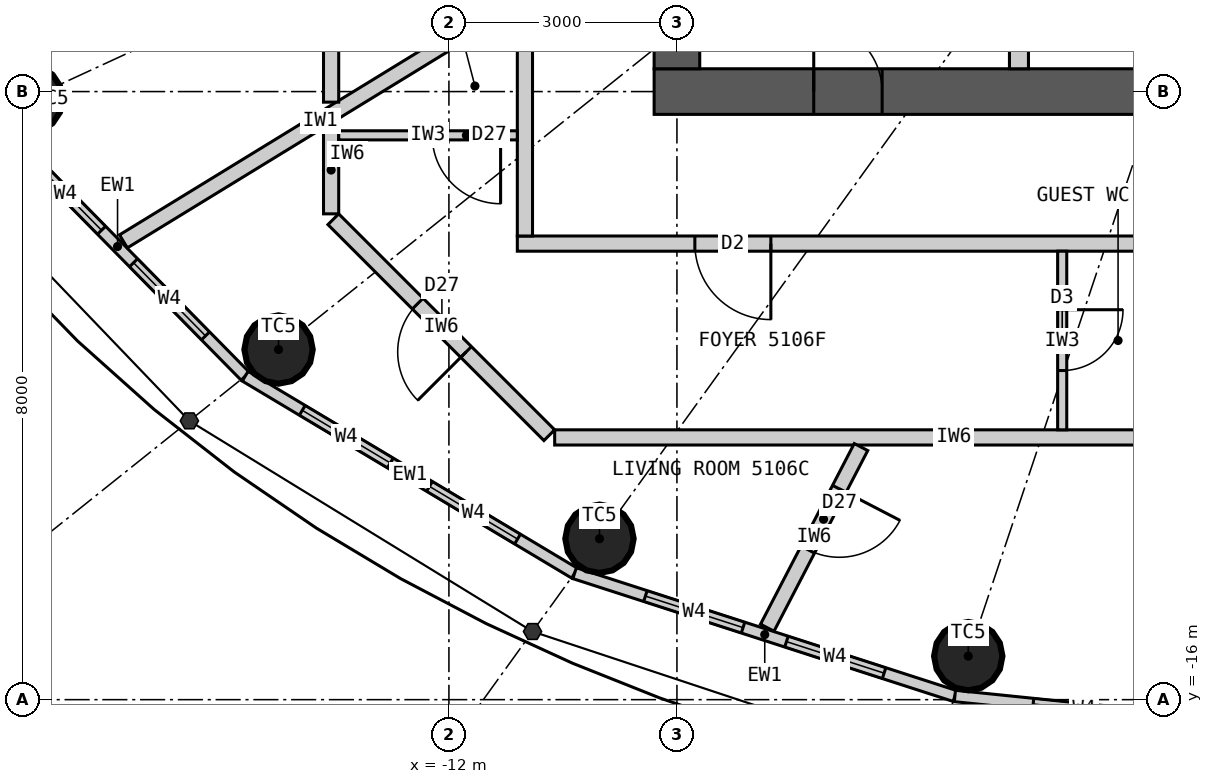
"""IFC4 building model, lengths in metres.
Left out: names, types, materials, properties, quantities, classifications, styles, units other than length and angle.
Written with IfcOpenShell. Run it as: python <this file> out.ifc"""

import sys

from ifc_helpers import new_model, si_unit, direction, frame, frame_2d, origin, origin_2d, place, context, subcontext, project, spatial, rectangle, circle, extrude, element, fill, save


model = new_model("IFC4")
c1 = context("Model", 3, precision=1e-05, world=origin(), true_north=direction((0.0, 1.0)))
c2 = subcontext(c1, "Body", "Model", "MODEL_VIEW")
j1 = project(units=[si_unit("LENGTHUNIT", "METRE"), si_unit("PLANEANGLEUNIT", "RADIAN")], contexts=[c1])
p1 = place(None, origin())
s1 = spatial("IfcSite", under=j1, at=p1, CompositionType="ELEMENT")
p2 = place(p1, origin())
s2 = spatial("IfcBuilding", under=s1, at=p2, CompositionType="ELEMENT")
p3 = place(p2, frame((0.0, 0.0, 192.9)))
s3 = spatial("IfcBuildingStorey", under=s2, at=p3, CompositionType="ELEMENT", Elevation=192.9)
for number, where, z_axis, x_axis in (
    (1, (-17.532, -8.098, 0.0), (0.0, 0.0, 1.0), (1.0, 0.0, 0.0)),
    (2, (-14.241, -11.393, 0.0), (0.0, 0.0, 1.0), (1.0, 0.0, 0.0)),
    (3, (-10.019, -13.883, 0.0), (0.0, 0.0, 1.0), (1.0, 0.0, 0.0)),
    (4, (-5.167, -15.427, 0.0), (0.0, 0.0, 1.0), (1.0, 0.0, 0.0)),
):
    element("IfcColumn", number, at=place(p3, frame(where, z_axis=z_axis, x_axis=x_axis)), inside=s3, PredefinedType="COLUMN", context=c2, shape_type="SweptSolid", body=[
        extrude(circle(Radius=0.45, at=origin_2d()), origin(), (0.0, 0.0, 1.0), 3.3),
    ])
p4 = place(p3, frame((9.3, -8.0, 0.0), z_axis=(0.0, 0.0, 1.0), x_axis=(-1.0, 0.0, 0.0)))
e5 = element("IfcWall", 5, at=p4, inside=s3, PredefinedType="SHEAR", context=c2, shape_type="SweptSolid", body=[
    extrude(rectangle(XDim=18.6, YDim=0.6, at=frame_2d((9.3, 0.0))), origin(), (0.0, 0.0, 1.0), 3.3),
])
p5 = place(p4, frame((8.0, 0.0, 0.0)))
e6 = element("IfcOpeningElement", 6, at=p5, cuts=e5, PredefinedType="OPENING", context=c2, shape_type="SweptSolid", body=[
    extrude(rectangle(XDim=1.2, YDim=2.2, at=frame_2d((0.6, 1.1))), frame((0.0, 0.31, 0.0), z_axis=(0.0, -1.0, 0.0), x_axis=(1.0, 0.0, 0.0)), (0.0, 0.0, 1.0), 0.62),
])
p6 = place(p4, frame((15.6, 0.0, 0.0)))
e7 = element("IfcOpeningElement", 7, at=p6, cuts=e5, PredefinedType="OPENING", context=c2, shape_type="SweptSolid", body=[
    extrude(rectangle(XDim=0.9, YDim=2.2, at=frame_2d((0.45, 1.1))), frame((0.0, 0.31, 0.0), z_axis=(0.0, -1.0, 0.0), x_axis=(1.0, 0.0, 0.0)), (0.0, 0.0, 1.0), 0.62),
])
p7 = place(p3, frame((-9.0, 7.7, 0.0), z_axis=(0.0, 0.0, 1.0), x_axis=(0.0, -1.0, 0.0)))
e8 = element("IfcWall", 8, at=p7, inside=s3, PredefinedType="SHEAR", context=c2, shape_type="SweptSolid", body=[
    extrude(rectangle(XDim=15.4, YDim=0.6, at=frame_2d((7.7, 0.0))), origin(), (0.0, 0.0, 1.0), 3.3),
])
p8 = place(p7, frame((6.8, 0.0, 0.0)))
e9 = element("IfcOpeningElement", 9, at=p8, cuts=e8, PredefinedType="OPENING", context=c2, shape_type="SweptSolid", body=[
    extrude(rectangle(XDim=1.8, YDim=2.2, at=frame_2d((0.9, 1.1))), frame((0.0, 0.31, 0.0), z_axis=(0.0, -1.0, 0.0), x_axis=(1.0, 0.0, 0.0)), (0.0, 0.0, 1.0), 0.62),
])
p9 = place(p3, frame((-4.5, -7.7, 0.0), z_axis=(0.0, 0.0, 1.0), x_axis=(0.0, 1.0, 0.0)))
e10 = element("IfcWall", 10, at=p9, inside=s3, PredefinedType="PARTITIONING", context=c2, shape_type="SweptSolid", body=[
    extrude(rectangle(XDim=3.2, YDim=0.25, at=frame_2d((1.6, 0.0))), origin(), (0.0, 0.0, 1.0), 3.3),
])
p10 = place(p3, frame((-18.04, -8.332, 0.0), z_axis=(0.0, 0.0, 1.0), x_axis=(0.701527379618, -0.712642501993, 0.0)))
e11 = element("IfcWall", 11, at=p10, inside=s3, PredefinedType="ELEMENTEDWALL", context=c2, shape_type="SweptSolid", body=[
    extrude(rectangle(XDim=4.788, YDim=0.15, at=frame_2d((2.394, 0.0))), origin(), (0.0, 0.0, 1.0), 3.12),
])
p11 = place(p10, frame((0.744, 0.0, 0.9)))
e12 = element("IfcOpeningElement", 12, at=p11, cuts=e11, PredefinedType="OPENING", context=c2, shape_type="SweptSolid", body=[
    extrude(rectangle(XDim=1.35, YDim=1.9, at=frame_2d((0.675, 0.95))), frame((0.0, 0.085, 0.0), z_axis=(0.0, -1.0, 0.0), x_axis=(1.0, 0.0, 0.0)), (0.0, 0.0, 1.0), 0.17),
])
p12 = place(p10, frame((2.694, 0.0, 0.9)))
e13 = element("IfcOpeningElement", 13, at=p12, cuts=e11, PredefinedType="OPENING", context=c2, shape_type="SweptSolid", body=[
    extrude(rectangle(XDim=1.35, YDim=1.9, at=frame_2d((0.675, 0.95))), frame((0.0, 0.085, 0.0), z_axis=(0.0, -1.0, 0.0), x_axis=(1.0, 0.0, 0.0)), (0.0, 0.0, 1.0), 0.17),
])
p13 = place(p3, frame((-14.68, -11.744, 0.0), z_axis=(0.0, 0.0, 1.0), x_axis=(0.85822150553, -0.513279502265, 0.0)))
e14 = element("IfcWall", 14, at=p13, inside=s3, PredefinedType="ELEMENTEDWALL", context=c2, shape_type="SweptSolid", body=[
    extrude(rectangle(XDim=5.05, YDim=0.15, at=frame_2d((2.525, 0.0))), origin(), (0.0, 0.0, 1.0), 3.12),
])
p14 = place(p13, frame((0.875, 0.0, 0.9)))
e15 = element("IfcOpeningElement", 15, at=p14, cuts=e14, PredefinedType="OPENING", context=c2, shape_type="SweptSolid", body=[
    extrude(rectangle(XDim=1.35, YDim=1.9, at=frame_2d((0.675, 0.95))), frame((0.0, 0.085, 0.0), z_axis=(0.0, -1.0, 0.0), x_axis=(1.0, 0.0, 0.0)), (0.0, 0.0, 1.0), 0.17),
])
p15 = place(p13, frame((2.825, 0.0, 0.9)))
e16 = element("IfcOpeningElement", 16, at=p15, cuts=e14, PredefinedType="OPENING", context=c2, shape_type="SweptSolid", body=[
    extrude(rectangle(XDim=1.35, YDim=1.9, at=frame_2d((0.675, 0.95))), frame((0.0, 0.085, 0.0), z_axis=(0.0, -1.0, 0.0), x_axis=(1.0, 0.0, 0.0)), (0.0, 0.0, 1.0), 0.17),
])
p16 = place(p3, frame((-10.346, -14.336, 0.0), z_axis=(0.0, 0.0, 1.0), x_axis=(0.951644702515, -0.307200846638, 0.0)))
e17 = element("IfcWall", 17, at=p16, inside=s3, PredefinedType="ELEMENTEDWALL", context=c2, shape_type="SweptSolid", body=[
    extrude(rectangle(XDim=5.258, YDim=0.15, at=frame_2d((2.629, 0.0))), origin(), (0.0, 0.0, 1.0), 3.12),
])
p17 = place(p16, frame((0.979, 0.0, 0.9)))
e18 = element("IfcOpeningElement", 18, at=p17, cuts=e17, PredefinedType="OPENING", context=c2, shape_type="SweptSolid", body=[
    extrude(rectangle(XDim=1.35, YDim=1.9, at=frame_2d((0.675, 0.95))), frame((0.0, 0.085, 0.0), z_axis=(0.0, -1.0, 0.0), x_axis=(1.0, 0.0, 0.0)), (0.0, 0.0, 1.0), 0.17),
])
p18 = place(p16, frame((2.929, 0.0, 0.9)))
e19 = element("IfcOpeningElement", 19, at=p18, cuts=e17, PredefinedType="OPENING", context=c2, shape_type="SweptSolid", body=[
    extrude(rectangle(XDim=1.35, YDim=1.9, at=frame_2d((0.675, 0.95))), frame((0.0, 0.085, 0.0), z_axis=(0.0, -1.0, 0.0), x_axis=(1.0, 0.0, 0.0)), (0.0, 0.0, 1.0), 0.17),
])
p19 = place(p3, frame((-5.343, -15.952, 0.0), z_axis=(0.0, 0.0, 1.0), x_axis=(0.994774574972, -0.102095763818, 0.0)))
e20 = element("IfcWall", 20, at=p19, inside=s3, PredefinedType="ELEMENTEDWALL", context=c2, shape_type="SweptSolid", body=[
    extrude(rectangle(XDim=5.371, YDim=0.15, at=frame_2d((2.686, 0.0))), origin(), (0.0, 0.0, 1.0), 3.12),
])
p20 = place(p19, frame((1.035, 0.0, 0.9)))
e21 = element("IfcOpeningElement", 21, at=p20, cuts=e20, PredefinedType="OPENING", context=c2, shape_type="SweptSolid", body=[
    extrude(rectangle(XDim=1.35, YDim=1.9, at=frame_2d((0.675, 0.95))), frame((0.0, 0.085, 0.0), z_axis=(0.0, -1.0, 0.0), x_axis=(1.0, 0.0, 0.0)), (0.0, 0.0, 1.0), 0.17),
])
p21 = place(p19, frame((2.985, 0.0, 0.9)))
e22 = element("IfcOpeningElement", 22, at=p21, cuts=e20, PredefinedType="OPENING", context=c2, shape_type="SweptSolid", body=[
    extrude(rectangle(XDim=1.35, YDim=1.9, at=frame_2d((0.675, 0.95))), frame((0.0, 0.085, 0.0), z_axis=(0.0, -1.0, 0.0), x_axis=(1.0, 0.0, 0.0)), (0.0, 0.0, 1.0), 0.17),
])
p22 = place(p3, frame((11.1, -10.0, 0.0), z_axis=(0.0, 0.0, 1.0), x_axis=(-1.0, 0.0, 0.0)))
e23 = element("IfcWall", 23, at=p22, inside=s3, PredefinedType="PARTITIONING", context=c2, shape_type="SweptSolid", body=[
    extrude(rectangle(XDim=22.2, YDim=0.2, at=frame_2d((11.1, 0.0))), origin(), (0.0, 0.0, 1.0), 3.12),
])
p23 = place(p22, frame((18.864, 0.0, 0.0)))
e24 = element("IfcOpeningElement", 24, at=p23, cuts=e23, PredefinedType="OPENING", context=c2, shape_type="SweptSolid", body=[
    extrude(rectangle(XDim=1.0, YDim=2.2, at=frame_2d((0.5, 1.1))), frame((0.0, 0.11, 0.0), z_axis=(0.0, -1.0, 0.0), x_axis=(1.0, 0.0, 0.0)), (0.0, 0.0, 1.0), 0.22),
])
p24 = place(p22, frame((2.309, 0.0, 0.0)))
e25 = element("IfcOpeningElement", 25, at=p24, cuts=e23, PredefinedType="OPENING", context=c2, shape_type="SweptSolid", body=[
    extrude(rectangle(XDim=1.0, YDim=2.2, at=frame_2d((0.5, 1.1))), frame((0.0, 0.11, 0.0), z_axis=(0.0, -1.0, 0.0), x_axis=(1.0, 0.0, 0.0)), (0.0, 0.0, 1.0), 0.22),
])
p25 = place(p3, frame((-11.0, 9.9, 0.0), z_axis=(0.0, 0.0, 1.0), x_axis=(0.0, -1.0, 0.0)))
e26 = element("IfcWall", 26, at=p25, inside=s3, PredefinedType="PARTITIONING", context=c2, shape_type="SweptSolid", body=[
    extrude(rectangle(XDim=19.8, YDim=0.2, at=frame_2d((9.9, 0.0))), origin(), (0.0, 0.0, 1.0), 3.12),
])
p26 = place(p25, frame((9.495, 0.0, 0.0)))
e27 = element("IfcOpeningElement", 27, at=p26, cuts=e26, PredefinedType="OPENING", context=c2, shape_type="SweptSolid", body=[
    extrude(rectangle(XDim=1.0, YDim=2.2, at=frame_2d((0.5, 1.1))), frame((0.0, 0.11, 0.0), z_axis=(0.0, -1.0, 0.0), x_axis=(1.0, 0.0, 0.0)), (0.0, 0.0, 1.0), 0.22),
])
p27 = place(p3, frame((-11.1, -6.797, 0.0), z_axis=(0.0, 0.0, 1.0), x_axis=(-0.852799818179, -0.522237943963, 0.0)))
e28 = element("IfcWall", 28, at=p27, inside=s3, PredefinedType="PARTITIONING", context=c2, shape_type="SweptSolid", body=[
    extrude(rectangle(XDim=6.077, YDim=0.2, at=frame_2d((3.039, 0.0))), origin(), (0.0, 0.0, 1.0), 3.12),
])
p28 = place(p3, frame((-13.55, 2.801, 0.0), z_axis=(0.0, 0.0, 1.0), x_axis=(0.0, -1.0, 0.0)))
e29 = element("IfcWall", 29, at=p28, inside=s3, PredefinedType="PARTITIONING", context=c2, shape_type="SweptSolid", body=[
    extrude(rectangle(XDim=10.94, YDim=0.2, at=frame_2d((5.47, 0.0))), origin(), (0.0, 0.0, 1.0), 3.12),
])
p29 = place(p28, frame((6.67, 0.0, 0.0)))
e30 = element("IfcOpeningElement", 30, at=p29, cuts=e29, PredefinedType="OPENING", context=c2, shape_type="SweptSolid", body=[
    extrude(rectangle(XDim=0.8, YDim=2.1, at=frame_2d((0.4, 1.05))), frame((0.0, 0.11, 0.0), z_axis=(0.0, -1.0, 0.0), x_axis=(1.0, 0.0, 0.0)), (0.0, 0.0, 1.0), 0.22),
])
p30 = place(p28, frame((2.872, 0.0, 0.0)))
e31 = element("IfcOpeningElement", 31, at=p30, cuts=e29, PredefinedType="OPENING", context=c2, shape_type="SweptSolid", body=[
    extrude(rectangle(XDim=0.9, YDim=2.1, at=frame_2d((0.45, 1.05))), frame((0.0, 0.11, 0.0), z_axis=(0.0, -1.0, 0.0), x_axis=(1.0, 0.0, 0.0)), (0.0, 0.0, 1.0), 0.22),
])
p31 = place(p3, frame((-13.55, -8.456, 0.0), z_axis=(0.0, 0.0, 1.0), x_axis=(0.0, -1.0, 0.0)))
e32 = element("IfcWall", 32, at=p31, inside=s3, PredefinedType="PARTITIONING", context=c2, shape_type="SweptSolid", body=[
    extrude(rectangle(XDim=1.153, YDim=0.2, at=frame_2d((0.576, 0.0))), origin(), (0.0, 0.0, 1.0), 3.12),
])
p32 = place(p3, frame((-13.521, -9.679, 0.0), z_axis=(0.0, 0.0, 1.0), x_axis=(0.707106781187, -0.707106781187, 0.0)))
e33 = element("IfcWall", 33, at=p32, inside=s3, PredefinedType="PARTITIONING", context=c2, shape_type="SweptSolid", body=[
    extrude(rectangle(XDim=4.019, YDim=0.2, at=frame_2d((2.009, 0.0))), origin(), (0.0, 0.0, 1.0), 3.12),
])
p33 = place(p32, frame((1.57, 0.0, 0.0)))
e34 = element("IfcOpeningElement", 34, at=p33, cuts=e33, PredefinedType="OPENING", context=c2, shape_type="SweptSolid", body=[
    extrude(rectangle(XDim=0.9, YDim=2.1, at=frame_2d((0.45, 1.05))), frame((0.0, 0.11, 0.0), z_axis=(0.0, -1.0, 0.0), x_axis=(1.0, 0.0, 0.0)), (0.0, 0.0, 1.0), 0.22),
])
p34 = place(p3, frame((-10.609, -12.55, 0.0), z_axis=(0.0, 0.0, 1.0), x_axis=(1.0, 0.0, 0.0)))
e35 = element("IfcWall", 35, at=p34, inside=s3, PredefinedType="PARTITIONING", context=c2, shape_type="SweptSolid", body=[
    extrude(rectangle(XDim=10.508, YDim=0.2, at=frame_2d((5.254, 0.0))), origin(), (0.0, 0.0, 1.0), 3.12),
])
p35 = place(p34, frame((8.308, 0.0, 0.0)))
e36 = element("IfcOpeningElement", 36, at=p35, cuts=e35, PredefinedType="OPENING", context=c2, shape_type="SweptSolid", body=[
    extrude(rectangle(XDim=0.8, YDim=2.1, at=frame_2d((0.4, 1.05))), frame((0.0, 0.11, 0.0), z_axis=(0.0, -1.0, 0.0), x_axis=(1.0, 0.0, 0.0)), (0.0, 0.0, 1.0), 0.22),
])
p36 = place(p3, frame((-6.578, -12.677, 0.0), z_axis=(0.0, 0.0, 1.0), x_axis=(-0.460620531465, -0.887597164255, 0.0)))
e37 = element("IfcWall", 37, at=p36, inside=s3, PredefinedType="PARTITIONING", context=c2, shape_type="SweptSolid", body=[
    extrude(rectangle(XDim=2.678, YDim=0.2, at=frame_2d((1.339, 0.0))), origin(), (0.0, 0.0, 1.0), 3.12),
])
p37 = place(p36, frame((0.62, 0.0, 0.0)))
e38 = element("IfcOpeningElement", 38, at=p37, cuts=e37, PredefinedType="OPENING", context=c2, shape_type="SweptSolid", body=[
    extrude(rectangle(XDim=0.9, YDim=2.1, at=frame_2d((0.45, 1.05))), frame((0.0, 0.11, 0.0), z_axis=(0.0, -1.0, 0.0), x_axis=(1.0, 0.0, 0.0)), (0.0, 0.0, 1.0), 0.22),
])
p38 = place(p3, frame((-11.1, -8.576, 0.0), z_axis=(0.0, 0.0, 1.0), x_axis=(-1.0, 0.0, 0.0)))
e39 = element("IfcWall", 39, at=p38, inside=s3, PredefinedType="PARTITIONING", context=c2, shape_type="SweptSolid", body=[
    extrude(rectangle(XDim=2.35, YDim=0.12, at=frame_2d((1.175, 0.0))), origin(), (0.0, 0.0, 1.0), 3.12),
])
p39 = place(p38, frame((0.22, 0.0, 0.0)))
e40 = element("IfcOpeningElement", 40, at=p39, cuts=e39, PredefinedType="OPENING", context=c2, shape_type="SweptSolid", body=[
    extrude(rectangle(XDim=0.9, YDim=2.1, at=frame_2d((0.45, 1.05))), frame((0.0, 0.07, 0.0), z_axis=(0.0, -1.0, 0.0), x_axis=(1.0, 0.0, 0.0)), (0.0, 0.0, 1.0), 0.14),
])
p40 = place(p3, frame((-3.931, -10.1, 0.0), z_axis=(0.0, 0.0, 1.0), x_axis=(0.0, -1.0, 0.0)))
e41 = element("IfcWall", 41, at=p40, inside=s3, PredefinedType="PARTITIONING", context=c2, shape_type="SweptSolid", body=[
    extrude(rectangle(XDim=2.35, YDim=0.12, at=frame_2d((1.175, 0.0))), origin(), (0.0, 0.0, 1.0), 3.12),
])
p41 = place(p40, frame((0.77, 0.0, 0.0)))
e42 = element("IfcOpeningElement", 42, at=p41, cuts=e41, PredefinedType="OPENING", context=c2, shape_type="SweptSolid", body=[
    extrude(rectangle(XDim=0.8, YDim=2.1, at=frame_2d((0.4, 1.05))), frame((0.0, 0.07, 0.0), z_axis=(0.0, -1.0, 0.0), x_axis=(1.0, 0.0, 0.0)), (0.0, 0.0, 1.0), 0.14),
])
p42 = place(p11, origin())
e43 = element("IfcWindow", 43, at=p42, inside=s3, PartitioningType="SINGLE_PANEL", PredefinedType="WINDOW", context=c2, shape_type="SweptSolid", body=[
    extrude(rectangle(XDim=1.35, YDim=1.9, at=frame_2d((0.675, 0.95))), frame((0.0, 0.03, 0.0), z_axis=(0.0, -1.0, 0.0), x_axis=(1.0, 0.0, 0.0)), (0.0, 0.0, 1.0), 0.06),
])
fill(e12, e43)
p43 = place(p12, origin())
e44 = element("IfcWindow", 44, at=p43, inside=s3, PartitioningType="SINGLE_PANEL", PredefinedType="WINDOW", context=c2, shape_type="SweptSolid", body=[
    extrude(rectangle(XDim=1.35, YDim=1.9, at=frame_2d((0.675, 0.95))), frame((0.0, 0.03, 0.0), z_axis=(0.0, -1.0, 0.0), x_axis=(1.0, 0.0, 0.0)), (0.0, 0.0, 1.0), 0.06),
])
fill(e13, e44)
p44 = place(p14, origin())
e45 = element("IfcWindow", 45, at=p44, inside=s3, PartitioningType="SINGLE_PANEL", PredefinedType="WINDOW", context=c2, shape_type="SweptSolid", body=[
    extrude(rectangle(XDim=1.35, YDim=1.9, at=frame_2d((0.675, 0.95))), frame((0.0, 0.03, 0.0), z_axis=(0.0, -1.0, 0.0), x_axis=(1.0, 0.0, 0.0)), (0.0, 0.0, 1.0), 0.06),
])
fill(e15, e45)
p45 = place(p15, origin())
e46 = element("IfcWindow", 46, at=p45, inside=s3, PartitioningType="SINGLE_PANEL", PredefinedType="WINDOW", context=c2, shape_type="SweptSolid", body=[
    extrude(rectangle(XDim=1.35, YDim=1.9, at=frame_2d((0.675, 0.95))), frame((0.0, 0.03, 0.0), z_axis=(0.0, -1.0, 0.0), x_axis=(1.0, 0.0, 0.0)), (0.0, 0.0, 1.0), 0.06),
])
fill(e16, e46)
p46 = place(p17, origin())
e47 = element("IfcWindow", 47, at=p46, inside=s3, PartitioningType="SINGLE_PANEL", PredefinedType="WINDOW", context=c2, shape_type="SweptSolid", body=[
    extrude(rectangle(XDim=1.35, YDim=1.9, at=frame_2d((0.675, 0.95))), frame((0.0, 0.03, 0.0), z_axis=(0.0, -1.0, 0.0), x_axis=(1.0, 0.0, 0.0)), (0.0, 0.0, 1.0), 0.06),
])
fill(e18, e47)
p47 = place(p18, origin())
e48 = element("IfcWindow", 48, at=p47, inside=s3, PartitioningType="SINGLE_PANEL", PredefinedType="WINDOW", context=c2, shape_type="SweptSolid", body=[
    extrude(rectangle(XDim=1.35, YDim=1.9, at=frame_2d((0.675, 0.95))), frame((0.0, 0.03, 0.0), z_axis=(0.0, -1.0, 0.0), x_axis=(1.0, 0.0, 0.0)), (0.0, 0.0, 1.0), 0.06),
])
fill(e19, e48)
p48 = place(p20, origin())
e49 = element("IfcWindow", 49, at=p48, inside=s3, PartitioningType="SINGLE_PANEL", PredefinedType="WINDOW", context=c2, shape_type="SweptSolid", body=[
    extrude(rectangle(XDim=1.35, YDim=1.9, at=frame_2d((0.675, 0.95))), frame((0.0, 0.03, 0.0), z_axis=(0.0, -1.0, 0.0), x_axis=(1.0, 0.0, 0.0)), (0.0, 0.0, 1.0), 0.06),
])
fill(e21, e49)
p49 = place(p23, origin())
e50 = element("IfcDoor", 50, at=p49, inside=s3, OperationType="SINGLE_SWING_LEFT", PredefinedType="DOOR", context=c2, shape_type="SweptSolid", body=[
    extrude(rectangle(XDim=1.0, YDim=2.2, at=frame_2d((0.5, 1.1))), frame((0.0, 0.025, 0.0), z_axis=(0.0, -1.0, 0.0), x_axis=(1.0, 0.0, 0.0)), (0.0, 0.0, 1.0), 0.05),
])
fill(e24, e50)
p50 = place(p39, origin())
e51 = element("IfcDoor", 51, at=p50, inside=s3, OperationType="SINGLE_SWING_LEFT", PredefinedType="DOOR", context=c2, shape_type="SweptSolid", body=[
    extrude(rectangle(XDim=0.9, YDim=2.1, at=frame_2d((0.45, 1.05))), frame((0.0, 0.025, 0.0), z_axis=(0.0, -1.0, 0.0), x_axis=(1.0, 0.0, 0.0)), (0.0, 0.0, 1.0), 0.05),
])
fill(e40, e51)
p51 = place(p41, origin())
e52 = element("IfcDoor", 52, at=p51, inside=s3, OperationType="SINGLE_SWING_LEFT", PredefinedType="DOOR", context=c2, shape_type="SweptSolid", body=[
    extrude(rectangle(XDim=0.8, YDim=2.1, at=frame_2d((0.4, 1.05))), frame((0.0, 0.025, 0.0), z_axis=(0.0, -1.0, 0.0), x_axis=(1.0, 0.0, 0.0)), (0.0, 0.0, 1.0), 0.05),
])
fill(e42, e52)
p52 = place(p33, origin())
e53 = element("IfcDoor", 53, at=p52, inside=s3, OperationType="SINGLE_SWING_RIGHT", PredefinedType="DOOR", context=c2, shape_type="SweptSolid", body=[
    extrude(rectangle(XDim=0.9, YDim=2.1, at=frame_2d((0.45, 1.05))), frame((0.0, 0.025, 0.0), z_axis=(0.0, -1.0, 0.0), x_axis=(1.0, 0.0, 0.0)), (0.0, 0.0, 1.0), 0.05),
])
fill(e34, e53)
p53 = place(p37, origin())
e54 = element("IfcDoor", 54, at=p53, inside=s3, OperationType="SINGLE_SWING_LEFT", PredefinedType="DOOR", context=c2, shape_type="SweptSolid", body=[
    extrude(rectangle(XDim=0.9, YDim=2.1, at=frame_2d((0.45, 1.05))), frame((0.0, 0.025, 0.0), z_axis=(0.0, -1.0, 0.0), x_axis=(1.0, 0.0, 0.0)), (0.0, 0.0, 1.0), 0.05),
])
fill(e38, e54)
p54 = place(p6, origin())
e55 = element("IfcDoor", 55, at=p54, inside=s3, OperationType="SINGLE_SWING_RIGHT", PredefinedType="DOOR", context=c2, shape_type="SweptSolid", body=[
    extrude(rectangle(XDim=0.9, YDim=2.2, at=frame_2d((0.45, 1.1))), frame((0.0, 0.025, 0.0), z_axis=(0.0, -1.0, 0.0), x_axis=(1.0, 0.0, 0.0)), (0.0, 0.0, 1.0), 0.05),
])
fill(e7, e55)
save(model, sys.argv[1])
